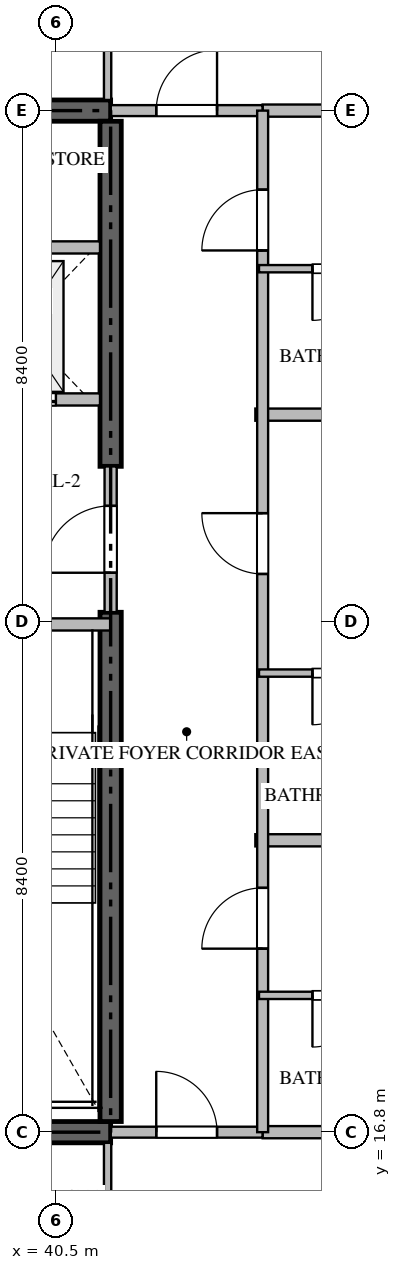
"""IFC4 building model, lengths in metres.
Left out: names, types, materials, properties, quantities, classifications, styles, units other than length and angle.
Written with IfcOpenShell. Run it as: python <this file> out.ifc"""

import sys

from ifc_helpers import new_model, si_unit, direction, frame, frame_2d, origin, place, context, subcontext, project, spatial, rectangle, extrude, source, transform, mapped, element, fill, save


model = new_model("IFC4")
c1 = context("Model", 3, precision=1e-05, world=origin(), true_north=direction((0.0, 1.0)))
c2 = subcontext(c1, "Body", "Model", "MODEL_VIEW")
j1 = project(units=[si_unit("LENGTHUNIT", "METRE"), si_unit("PLANEANGLEUNIT", "RADIAN")], contexts=[c1])
p1 = place(None, origin())
s1 = spatial("IfcSite", under=j1, at=p1, CompositionType="ELEMENT")
p2 = place(p1, origin())
s2 = spatial("IfcBuilding", under=s1, at=p2, CompositionType="ELEMENT")
p3 = place(p2, frame((0.0, 0.0, 252.8)))
s3 = spatial("IfcBuildingStorey", under=s2, at=p3, CompositionType="ELEMENT", Elevation=252.8)
for number, where, z_axis, x_axis in (
    (1, (23.4, 16.8, -0.26), (0.0, 0.0, 1.0), (1.0, 0.0, 0.0)),
    (2, (41.4, 33.6, -0.26), (0.0, 0.0, 1.0), (-1.0, 0.0, 0.0)),
):
    element("IfcWall", number, at=place(p3, frame(where, z_axis=z_axis, x_axis=x_axis)), inside=s3, PredefinedType="SHEAR", context=c2, shape_type="SweptSolid", body=[
        extrude(rectangle(XDim=18.0, YDim=0.35, at=frame_2d((9.0, 0.0))), origin(), (0.0, 0.0, 1.0), 3.848),
    ])
p4 = place(p3, frame((41.4, 16.975, -0.26), z_axis=(0.0, 0.0, 1.0), x_axis=(0.0, 1.0, 0.0)))
e3 = element("IfcWall", 3, at=p4, inside=s3, PredefinedType="SHEAR", context=c2, shape_type="SweptSolid", body=[
    extrude(rectangle(XDim=8.375, YDim=0.35, at=frame_2d((4.188, 0.0))), origin(), (0.0, 0.0, 1.0), 3.848),
])
p5 = place(p3, frame((41.4, 27.75, -0.26), z_axis=(0.0, 0.0, 1.0), x_axis=(0.0, 1.0, 0.0)))
e4 = element("IfcWall", 4, at=p5, inside=s3, PredefinedType="SHEAR", context=c2, shape_type="SweptSolid", body=[
    extrude(rectangle(XDim=5.675, YDim=0.35, at=frame_2d((2.837, 0.0))), origin(), (0.0, 0.0, 1.0), 3.848),
])
p6 = place(p3, frame((36.95, 25.15, 0.0), z_axis=(0.0, 0.0, 1.0), x_axis=(1.0, 0.0, 0.0)))
e5 = element("IfcWall", 5, at=p6, inside=s3, PredefinedType="STANDARD", context=c2, shape_type="SweptSolid", body=[
    extrude(rectangle(XDim=4.45, YDim=0.2, at=frame_2d((2.225, 0.0))), origin(), (0.0, 0.0, 1.0), 3.59),
])
p7 = place(p6, frame((1.65, 0.0, 0.0)))
e6 = element("IfcOpeningElement", 6, at=p7, cuts=e5, PredefinedType="OPENING", context=c2, shape_type="SweptSolid", body=[
    extrude(rectangle(XDim=1.1, YDim=2.15, at=frame_2d((0.55, 1.075))), frame((0.0, 0.11, 0.0), z_axis=(0.0, -1.0, 0.0), x_axis=(1.0, 0.0, 0.0)), (0.0, 0.0, 1.0), 0.22),
])
p8 = place(p3, frame((38.75, 28.85, 0.0), z_axis=(0.0, 0.0, 1.0), x_axis=(1.0, 0.0, 0.0)))
e7 = element("IfcWall", 7, at=p8, inside=s3, PredefinedType="STANDARD", context=c2, shape_type="SweptSolid", body=[
    extrude(rectangle(XDim=2.475, YDim=0.2, at=frame_2d((1.238, 0.0))), origin(), (0.0, 0.0, 1.0), 3.59),
])
p9 = place(p8, frame((0.55, 0.0, 0.0)))
e8 = element("IfcOpeningElement", 8, at=p9, cuts=e7, PredefinedType="OPENING", context=c2, shape_type="SweptSolid", body=[
    extrude(rectangle(XDim=1.2, YDim=2.2, at=frame_2d((0.6, 1.1))), frame((0.0, 0.11, 0.0), z_axis=(0.0, -1.0, 0.0), x_axis=(1.0, 0.0, 0.0)), (0.0, 0.0, 1.0), 0.22),
])
p10 = place(p3, frame((38.75, 31.35, 0.0), z_axis=(0.0, 0.0, 1.0), x_axis=(1.0, 0.0, 0.0)))
e9 = element("IfcWall", 9, at=p10, inside=s3, PredefinedType="STANDARD", context=c2, shape_type="SweptSolid", body=[
    extrude(rectangle(XDim=2.475, YDim=0.2, at=frame_2d((1.238, 0.0))), origin(), (0.0, 0.0, 1.0), 3.59),
])
p11 = place(p3, frame((41.4, 25.352, 0.0), z_axis=(0.0, 0.0, 1.0), x_axis=(0.0, 1.0, 0.0)))
e10 = element("IfcWall", 10, at=p11, inside=s3, PredefinedType="STANDARD", context=c2, shape_type="SweptSolid", body=[
    extrude(rectangle(XDim=2.396, YDim=0.2, at=frame_2d((1.198, 0.0))), origin(), (0.0, 0.0, 1.0), 3.59),
])
p12 = place(p11, frame((0.648, 0.0, 0.0)))
e11 = element("IfcOpeningElement", 11, at=p12, cuts=e10, PredefinedType="OPENING", context=c2, shape_type="SweptSolid", body=[
    extrude(rectangle(XDim=1.1, YDim=2.15, at=frame_2d((0.55, 1.075))), frame((0.0, 0.11, 0.0), z_axis=(0.0, -1.0, 0.0), x_axis=(1.0, 0.0, 0.0)), (0.0, 0.0, 1.0), 0.22),
])
for number, where, z_axis, x_axis in (
    (12, (43.78, 21.6, 0.0), (0.0, 0.0, 1.0), (1.0, 0.0, 0.0)),
    (13, (43.78, 28.6, 0.0), (0.0, 0.0, 1.0), (1.0, 0.0, 0.0)),
):
    element("IfcWall", number, at=place(p3, frame(where, z_axis=z_axis, x_axis=x_axis)), inside=s3, PredefinedType="PARTITIONING", context=c2, shape_type="SweptSolid", body=[
        extrude(rectangle(XDim=13.538, YDim=0.2, at=frame_2d((6.769, 0.0))), origin(), (0.0, 0.0, 1.0), 3.59),
    ])
for number, where, z_axis, x_axis in (
    (14, (43.9, 16.8, 0.0), (0.0, 0.0, 1.0), (1.0, 0.0, 0.0)),
    (15, (43.9, 33.6, 0.0), (0.0, 0.0, 1.0), (1.0, 0.0, 0.0)),
):
    element("IfcWall", number, at=place(p3, frame(where, z_axis=z_axis, x_axis=x_axis)), inside=s3, PredefinedType="PARTITIONING", context=c2, shape_type="SweptSolid", body=[
        extrude(rectangle(XDim=13.418, YDim=0.2, at=frame_2d((6.709, 0.0))), origin(), (0.0, 0.0, 1.0), 3.59),
    ])
p13 = place(p3, frame((41.402, 16.8, 0.0), z_axis=(0.0, 0.0, 1.0), x_axis=(1.0, 0.0, 0.0)))
e16 = element("IfcWall", 16, at=p13, inside=s3, PredefinedType="PARTITIONING", context=c2, shape_type="SweptSolid", body=[
    extrude(rectangle(XDim=2.496, YDim=0.18, at=frame_2d((1.248, 0.0))), origin(), (0.0, 0.0, 1.0), 3.59),
])
p14 = place(p13, frame((0.748, 0.0, 0.0)))
e17 = element("IfcOpeningElement", 17, at=p14, cuts=e16, PredefinedType="OPENING", context=c2, shape_type="SweptSolid", body=[
    extrude(rectangle(XDim=1.0, YDim=2.15, at=frame_2d((0.5, 1.075))), frame((0.0, 0.1, 0.0), z_axis=(0.0, -1.0, 0.0), x_axis=(1.0, 0.0, 0.0)), (0.0, 0.0, 1.0), 0.2),
])
p15 = place(p3, frame((41.402, 33.6, 0.0), z_axis=(0.0, 0.0, 1.0), x_axis=(1.0, 0.0, 0.0)))
e18 = element("IfcWall", 18, at=p15, inside=s3, PredefinedType="PARTITIONING", context=c2, shape_type="SweptSolid", body=[
    extrude(rectangle(XDim=2.496, YDim=0.18, at=frame_2d((1.248, 0.0))), origin(), (0.0, 0.0, 1.0), 3.59),
])
p16 = place(p15, frame((0.748, 0.0, 0.0)))
e19 = element("IfcOpeningElement", 19, at=p16, cuts=e18, PredefinedType="OPENING", context=c2, shape_type="SweptSolid", body=[
    extrude(rectangle(XDim=1.0, YDim=2.15, at=frame_2d((0.5, 1.075))), frame((0.0, 0.1, 0.0), z_axis=(0.0, -1.0, 0.0), x_axis=(1.0, 0.0, 0.0)), (0.0, 0.0, 1.0), 0.2),
])
p17 = place(p3, frame((43.9, 16.8, 0.0), z_axis=(0.0, 0.0, 1.0), x_axis=(0.0, 1.0, 0.0)))
e20 = element("IfcWall", 20, at=p17, inside=s3, PredefinedType="PARTITIONING", context=c2, shape_type="SweptSolid", body=[
    extrude(rectangle(XDim=16.8, YDim=0.18, at=frame_2d((8.4, 0.0))), origin(), (0.0, 0.0, 1.0), 3.59),
])
p18 = place(p17, frame((3.018, 0.0, 0.0)))
e21 = element("IfcOpeningElement", 21, at=p18, cuts=e20, PredefinedType="OPENING", context=c2, shape_type="SweptSolid", body=[
    extrude(rectangle(XDim=1.0, YDim=2.15, at=frame_2d((0.5, 1.075))), frame((0.0, 0.1, 0.0), z_axis=(0.0, -1.0, 0.0), x_axis=(1.0, 0.0, 0.0)), (0.0, 0.0, 1.0), 0.2),
])
p19 = place(p17, frame((9.18, 0.0, 0.0)))
e22 = element("IfcOpeningElement", 22, at=p19, cuts=e20, PredefinedType="OPENING", context=c2, shape_type="SweptSolid", body=[
    extrude(rectangle(XDim=1.0, YDim=2.15, at=frame_2d((0.5, 1.075))), frame((0.0, 0.1, 0.0), z_axis=(0.0, -1.0, 0.0), x_axis=(1.0, 0.0, 0.0)), (0.0, 0.0, 1.0), 0.2),
])
p20 = place(p17, frame((14.5, 0.0, 0.0)))
e23 = element("IfcOpeningElement", 23, at=p20, cuts=e20, PredefinedType="OPENING", context=c2, shape_type="SweptSolid", body=[
    extrude(rectangle(XDim=1.0, YDim=2.15, at=frame_2d((0.5, 1.075))), frame((0.0, 0.1, 0.0), z_axis=(0.0, -1.0, 0.0), x_axis=(1.0, 0.0, 0.0)), (0.0, 0.0, 1.0), 0.2),
])
p21 = place(p3, frame((41.35, 14.05, 0.0), z_axis=(0.0, 0.0, 1.0), x_axis=(0.0, 1.0, 0.0)))
e24 = element("IfcWall", 24, at=p21, inside=s3, PredefinedType="PARTITIONING", context=c2, shape_type="SweptSolid", body=[
    extrude(rectangle(XDim=2.575, YDim=0.12, at=frame_2d((1.288, 0.0))), origin(), (0.0, 0.0, 1.0), 3.59),
])
p22 = place(p3, frame((41.35, 36.35, 0.0), z_axis=(0.0, 0.0, 1.0), x_axis=(0.0, -1.0, 0.0)))
e25 = element("IfcWall", 25, at=p22, inside=s3, PredefinedType="PARTITIONING", context=c2, shape_type="SweptSolid", body=[
    extrude(rectangle(XDim=2.575, YDim=0.12, at=frame_2d((1.288, 0.0))), origin(), (0.0, 0.0, 1.0), 3.59),
])
p23 = place(p3, frame((46.448, 19.05, 0.0), z_axis=(0.0, 0.0, 1.0), x_axis=(-1.0, 0.0, 0.0)))
e26 = element("IfcWall", 26, at=p23, inside=s3, PredefinedType="PARTITIONING", context=c2, shape_type="SweptSolid", body=[
    extrude(rectangle(XDim=2.608, YDim=0.12, at=frame_2d((1.304, 0.0))), origin(), (0.0, 0.0, 1.0), 3.59),
])
p24 = place(p23, frame((0.879, 0.0, 0.0)))
e27 = element("IfcOpeningElement", 27, at=p24, cuts=e26, PredefinedType="OPENING", context=c2, shape_type="SweptSolid", body=[
    extrude(rectangle(XDim=0.85, YDim=2.1, at=frame_2d((0.425, 1.05))), frame((0.0, 0.07, 0.0), z_axis=(0.0, -1.0, 0.0), x_axis=(1.0, 0.0, 0.0)), (0.0, 0.0, 1.0), 0.14),
])
p25 = place(p3, frame((46.448, 24.35, 0.0), z_axis=(0.0, 0.0, 1.0), x_axis=(-1.0, 0.0, 0.0)))
e28 = element("IfcWall", 28, at=p25, inside=s3, PredefinedType="PARTITIONING", context=c2, shape_type="SweptSolid", body=[
    extrude(rectangle(XDim=2.608, YDim=0.12, at=frame_2d((1.304, 0.0))), origin(), (0.0, 0.0, 1.0), 3.59),
])
p26 = place(p25, frame((0.879, 0.0, 0.0)))
e29 = element("IfcOpeningElement", 29, at=p26, cuts=e28, PredefinedType="OPENING", context=c2, shape_type="SweptSolid", body=[
    extrude(rectangle(XDim=0.85, YDim=2.1, at=frame_2d((0.425, 1.05))), frame((0.0, 0.07, 0.0), z_axis=(0.0, -1.0, 0.0), x_axis=(1.0, 0.0, 0.0)), (0.0, 0.0, 1.0), 0.14),
])
p27 = place(p3, frame((46.448, 31.0, 0.0), z_axis=(0.0, 0.0, 1.0), x_axis=(-1.0, 0.0, 0.0)))
e30 = element("IfcWall", 30, at=p27, inside=s3, PredefinedType="PARTITIONING", context=c2, shape_type="SweptSolid", body=[
    extrude(rectangle(XDim=2.608, YDim=0.12, at=frame_2d((1.304, 0.0))), origin(), (0.0, 0.0, 1.0), 3.59),
])
p28 = place(p27, frame((0.879, 0.0, 0.0)))
e31 = element("IfcOpeningElement", 31, at=p28, cuts=e30, PredefinedType="OPENING", context=c2, shape_type="SweptSolid", body=[
    extrude(rectangle(XDim=0.85, YDim=2.1, at=frame_2d((0.425, 1.05))), frame((0.0, 0.07, 0.0), z_axis=(0.0, -1.0, 0.0), x_axis=(1.0, 0.0, 0.0)), (0.0, 0.0, 1.0), 0.14),
])
m1 = source(origin(), c2, "Body", "SweptSolid", [
    extrude(rectangle(XDim=1.2, YDim=2.2, at=frame_2d((0.6, 1.1))), frame((0.0, 0.025, 0.0), z_axis=(0.0, -1.0, 0.0), x_axis=(1.0, 0.0, 0.0)), (0.0, 0.0, 1.0), 0.05),
])
p29 = place(p9, origin())
e32 = element("IfcDoor", 32, at=p29, inside=s3, OperationType="DOUBLE_DOOR_SLIDING", PredefinedType="DOOR", context=c2, shape_type="MappedRepresentation", body=[
    mapped(m1, transform((0.0, 0.0, 0.0), scale=1.0)),
])
fill(e8, e32)
m2 = source(origin(), c2, "Body", "SweptSolid", [
    extrude(rectangle(XDim=1.1, YDim=2.15, at=frame_2d((0.55, 1.075))), frame((0.0, 0.025, 0.0), z_axis=(0.0, -1.0, 0.0), x_axis=(1.0, 0.0, 0.0)), (0.0, 0.0, 1.0), 0.05),
])
p30 = place(p12, origin())
e33 = element("IfcDoor", 33, at=p30, inside=s3, OperationType="SINGLE_SWING_LEFT", PredefinedType="DOOR", context=c2, shape_type="MappedRepresentation", body=[
    mapped(m2, transform((0.0, 0.0, 0.0), scale=1.0)),
])
fill(e11, e33)
m3 = source(origin(), c2, "Body", "SweptSolid", [
    extrude(rectangle(XDim=1.0, YDim=2.15, at=frame_2d((0.5, 1.075))), frame((0.0, 0.025, 0.0), z_axis=(0.0, -1.0, 0.0), x_axis=(1.0, 0.0, 0.0)), (0.0, 0.0, 1.0), 0.05),
])
p31 = place(p14, origin())
e34 = element("IfcDoor", 34, at=p31, inside=s3, OperationType="SINGLE_SWING_LEFT", PredefinedType="DOOR", context=c2, shape_type="MappedRepresentation", body=[
    mapped(m3, transform((0.0, 0.0, 0.0), scale=1.0)),
])
fill(e17, e34)
p32 = place(p16, origin())
e35 = element("IfcDoor", 35, at=p32, inside=s3, OperationType="SINGLE_SWING_RIGHT", PredefinedType="DOOR", context=c2, shape_type="MappedRepresentation", body=[
    mapped(m3, transform((0.0, 0.0, 0.0), scale=1.0)),
])
fill(e19, e35)
p33 = place(p18, origin())
e36 = element("IfcDoor", 36, at=p33, inside=s3, OperationType="SINGLE_SWING_LEFT", PredefinedType="DOOR", context=c2, shape_type="MappedRepresentation", body=[
    mapped(m3, transform((0.0, 0.0, 0.0), scale=1.0)),
])
fill(e21, e36)
p34 = place(p19, origin())
e37 = element("IfcDoor", 37, at=p34, inside=s3, OperationType="SINGLE_SWING_RIGHT", PredefinedType="DOOR", context=c2, shape_type="MappedRepresentation", body=[
    mapped(m3, transform((0.0, 0.0, 0.0), scale=1.0)),
])
fill(e22, e37)
p35 = place(p20, origin())
e38 = element("IfcDoor", 38, at=p35, inside=s3, OperationType="SINGLE_SWING_LEFT", PredefinedType="DOOR", context=c2, shape_type="MappedRepresentation", body=[
    mapped(m3, transform((0.0, 0.0, 0.0), scale=1.0)),
])
fill(e23, e38)
m4 = source(origin(), c2, "Body", "SweptSolid", [
    extrude(rectangle(XDim=0.85, YDim=2.1, at=frame_2d((0.425, 1.05))), frame((0.0, 0.025, 0.0), z_axis=(0.0, -1.0, 0.0), x_axis=(1.0, 0.0, 0.0)), (0.0, 0.0, 1.0), 0.05),
])
p36 = place(p24, origin())
e39 = element("IfcDoor", 39, at=p36, inside=s3, OperationType="SINGLE_SWING_RIGHT", PredefinedType="DOOR", context=c2, shape_type="MappedRepresentation", body=[
    mapped(m4, transform((0.0, 0.0, 0.0), scale=1.0)),
])
fill(e27, e39)
p37 = place(p26, origin())
e40 = element("IfcDoor", 40, at=p37, inside=s3, OperationType="SINGLE_SWING_RIGHT", PredefinedType="DOOR", context=c2, shape_type="MappedRepresentation", body=[
    mapped(m4, transform((0.0, 0.0, 0.0), scale=1.0)),
])
fill(e29, e40)
p38 = place(p28, origin())
e41 = element("IfcDoor", 41, at=p38, inside=s3, OperationType="SINGLE_SWING_RIGHT", PredefinedType="DOOR", context=c2, shape_type="MappedRepresentation", body=[
    mapped(m4, transform((0.0, 0.0, 0.0), scale=1.0)),
])
fill(e31, e41)
save(model, sys.argv[1])
